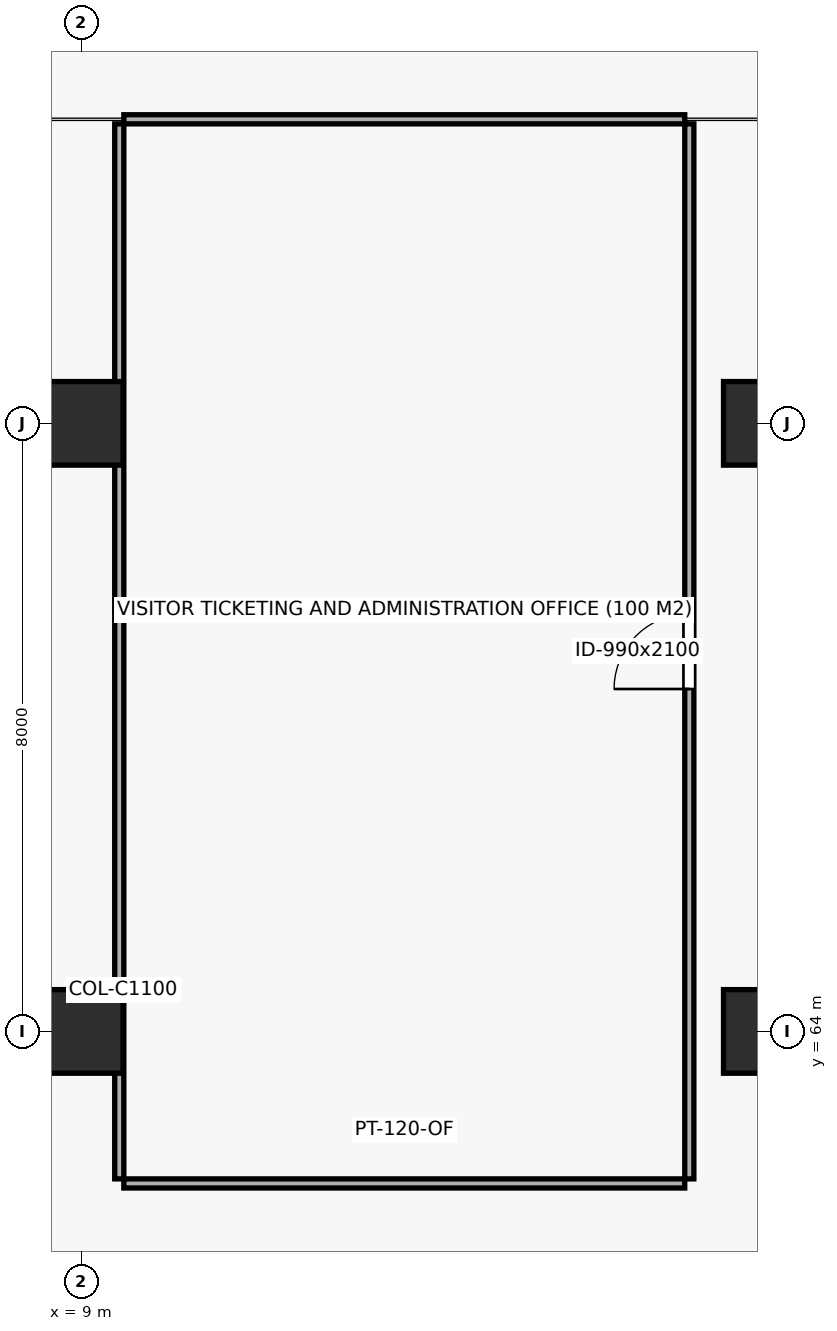
"""IFC4 building model, lengths in metres.
Left out: names, types, materials, properties, quantities, classifications, styles, units other than length and angle.
Written with IfcOpenShell. Run it as: python <this file> out.ifc"""

import sys

from ifc_helpers import new_model, si_unit, direction, frame, frame_2d, origin, origin_2d, place, context, subcontext, project, spatial, rectangle, extrude, element, fill, save


model = new_model("IFC4")
c1 = context("Model", 3, precision=1e-05, world=origin(), true_north=direction((0.0, 1.0)))
c2 = subcontext(c1, "Body", "Model", "MODEL_VIEW")
j1 = project(units=[si_unit("LENGTHUNIT", "METRE"), si_unit("PLANEANGLEUNIT", "RADIAN")], contexts=[c1])
p1 = place(None, origin())
s1 = spatial("IfcSite", under=j1, at=p1, CompositionType="ELEMENT")
p2 = place(p1, origin())
s2 = spatial("IfcBuilding", under=s1, at=p2, CompositionType="ELEMENT")
p3 = place(p2, origin())
s3 = spatial("IfcBuildingStorey", under=s2, at=p3, CompositionType="ELEMENT", Elevation=0.0)
for number, where, z_axis, x_axis in (
    (1, (9.0, 64.0, 0.0), (0.0, 0.0, 1.0), (1.0, 0.0, 0.0)),
    (2, (9.0, 72.0, 0.0), (0.0, 0.0, 1.0), (1.0, 0.0, 0.0)),
    (3, (18.0, 64.0, 0.0), (0.0, 0.0, 1.0), (1.0, 0.0, 0.0)),
    (4, (18.0, 72.0, 0.0), (0.0, 0.0, 1.0), (1.0, 0.0, 0.0)),
):
    element("IfcColumn", number, at=place(p3, frame(where, z_axis=z_axis, x_axis=x_axis)), inside=s3, PredefinedType="COLUMN", context=c2, shape_type="SweptSolid", body=[
        extrude(rectangle(XDim=1.1, YDim=1.1, at=origin_2d()), origin(), (0.0, 0.0, 1.0), 4.5),
    ])
p4 = place(p3, frame((9.56, 62.0, 0.0), z_axis=(0.0, 0.0, 1.0), x_axis=(1.0, 0.0, 0.0)))
e5 = element("IfcWall", 5, at=p4, inside=s3, PredefinedType="PARTITIONING", context=c2, shape_type="SweptSolid", body=[
    extrude(rectangle(XDim=7.38, YDim=0.12, at=frame_2d((3.69, 0.0))), origin(), (0.0, 0.0, 1.0), 3.3),
])
p5 = place(p3, frame((9.56, 76.0, 0.0), z_axis=(0.0, 0.0, 1.0), x_axis=(1.0, 0.0, 0.0)))
e6 = element("IfcWall", 6, at=p5, inside=s3, PredefinedType="PARTITIONING", context=c2, shape_type="SweptSolid", body=[
    extrude(rectangle(XDim=7.38, YDim=0.12, at=frame_2d((3.69, 0.0))), origin(), (0.0, 0.0, 1.0), 2.7),
])
p6 = place(p3, frame((9.5, 62.06, 0.0), z_axis=(0.0, 0.0, 1.0), x_axis=(0.0, 1.0, 0.0)))
e7 = element("IfcWall", 7, at=p6, inside=s3, PredefinedType="PARTITIONING", context=c2, shape_type="SweptSolid", body=[
    extrude(rectangle(XDim=13.88, YDim=0.12, at=frame_2d((6.94, 0.0))), origin(), (0.0, 0.0, 1.0), 3.3),
])
p7 = place(p3, frame((17.0, 62.06, 0.0), z_axis=(0.0, 0.0, 1.0), x_axis=(0.0, 1.0, 0.0)))
e8 = element("IfcWall", 8, at=p7, inside=s3, PredefinedType="PARTITIONING", context=c2, shape_type="SweptSolid", body=[
    extrude(rectangle(XDim=13.88, YDim=0.12, at=frame_2d((6.94, 0.0))), origin(), (0.0, 0.0, 1.0), 3.3),
])
p8 = place(p7, frame((6.445, 0.0, 0.0)))
e9 = element("IfcOpeningElement", 9, at=p8, cuts=e8, PredefinedType="OPENING", context=c2, shape_type="SweptSolid", body=[
    extrude(rectangle(XDim=0.99, YDim=2.1, at=frame_2d((0.495, 1.05))), frame((0.0, 0.072, 0.0), z_axis=(0.0, -1.0, 0.0), x_axis=(1.0, 0.0, 0.0)), (0.0, 0.0, 1.0), 0.144),
])
p9 = place(p8, origin())
e10 = element("IfcDoor", 10, at=p9, inside=s3, OperationType="SINGLE_SWING_LEFT", PredefinedType="DOOR", context=c2, shape_type="SweptSolid", body=[
    extrude(rectangle(XDim=0.99, YDim=2.1, at=frame_2d((0.495, 1.05))), frame((0.0, 0.025, 0.0), z_axis=(0.0, -1.0, 0.0), x_axis=(1.0, 0.0, 0.0)), (0.0, 0.0, 1.0), 0.05),
])
fill(e9, e10)
save(model, sys.argv[1])
